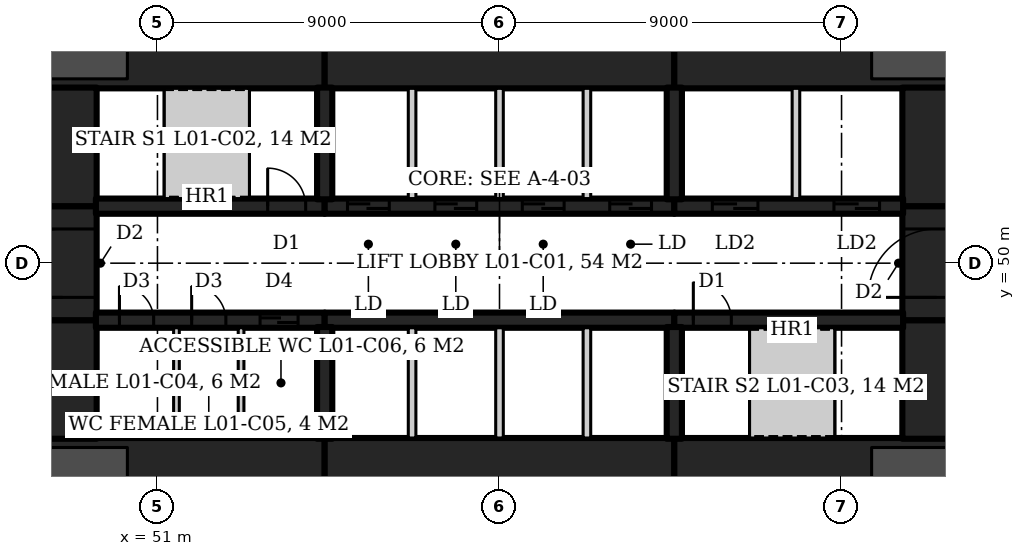
"""IFC4 building model, lengths in metres.
Left out: names, types, materials, properties, quantities, classifications, styles, units other than length and angle.
Written with IfcOpenShell. Run it as: python <this file> out.ifc"""

import sys

from ifc_helpers import new_model, si_unit, direction, frame, frame_2d, origin, origin_2d, place, context, subcontext, project, spatial, rectangle, circle, extrude, element, fill, save


model = new_model("IFC4")
c1 = context("Model", 3, precision=1e-05, world=origin(), true_north=direction((0.0, 1.0)))
c2 = subcontext(c1, "Body", "Model", "MODEL_VIEW")
j1 = project(units=[si_unit("LENGTHUNIT", "METRE"), si_unit("PLANEANGLEUNIT", "RADIAN")], contexts=[c1])
p1 = place(None, origin())
s1 = spatial("IfcSite", under=j1, at=p1, CompositionType="ELEMENT")
p2 = place(p1, origin())
s2 = spatial("IfcBuilding", under=s1, at=p2, CompositionType="ELEMENT")
p3 = place(p2, frame((0.0, 0.0, 6.0)))
s3 = spatial("IfcBuildingStorey", under=s2, at=p3, CompositionType="ELEMENT", Elevation=6.0)
for number, where, z_axis, x_axis in (
    (1, (71.691, 56.75, 0.0), (0.0, 0.0, 1.0), (1.0, 0.0, 0.0)),
    (2, (48.309, 56.75, 0.0), (0.0, 0.0, 1.0), (1.0, 0.0, 0.0)),
    (3, (48.309, 43.25, 0.0), (0.0, 0.0, 1.0), (1.0, 0.0, 0.0)),
    (4, (71.691, 43.25, 0.0), (0.0, 0.0, 1.0), (1.0, 0.0, 0.0)),
):
    element("IfcColumn", number, at=place(p3, frame(where, z_axis=z_axis, x_axis=x_axis)), inside=s3, PredefinedType="COLUMN", context=c2, shape_type="SweptSolid", body=[
        extrude(circle(Radius=1.9, at=origin_2d()), origin(), (0.0, 0.0, 1.0), 9.0),
    ])
p4 = place(p3, frame((47.6, 55.5, 0.0), z_axis=(0.0, 0.0, 1.0), x_axis=(1.0, 0.0, 0.0)))
e5 = element("IfcWall", 5, at=p4, inside=s3, PredefinedType="SHEAR", context=c2, shape_type="SweptSolid", body=[
    extrude(rectangle(XDim=7.8, YDim=1.8, at=frame_2d((3.9, 0.0))), origin(), (0.0, 0.0, 1.0), 9.0),
])
p5 = place(p3, frame((55.4, 55.5, 0.0), z_axis=(0.0, 0.0, 1.0), x_axis=(1.0, 0.0, 0.0)))
e6 = element("IfcWall", 6, at=p5, inside=s3, PredefinedType="SHEAR", context=c2, shape_type="SweptSolid", body=[
    extrude(rectangle(XDim=9.2, YDim=1.8, at=frame_2d((4.6, 0.0))), origin(), (0.0, 0.0, 1.0), 9.0),
])
for number, where, z_axis, x_axis in (
    (7, (64.6, 55.5, 0.0), (0.0, 0.0, 1.0), (1.0, 0.0, 0.0)),
    (8, (47.6, 44.5, 0.0), (0.0, 0.0, 1.0), (1.0, 0.0, 0.0)),
):
    element("IfcWall", number, at=place(p3, frame(where, z_axis=z_axis, x_axis=x_axis)), inside=s3, PredefinedType="SHEAR", context=c2, shape_type="SweptSolid", body=[
        extrude(rectangle(XDim=7.8, YDim=1.8, at=frame_2d((3.9, 0.0))), origin(), (0.0, 0.0, 1.0), 9.0),
    ])
p6 = place(p3, frame((55.4, 44.5, 0.0), z_axis=(0.0, 0.0, 1.0), x_axis=(1.0, 0.0, 0.0)))
e9 = element("IfcWall", 9, at=p6, inside=s3, PredefinedType="SHEAR", context=c2, shape_type="SweptSolid", body=[
    extrude(rectangle(XDim=9.2, YDim=1.8, at=frame_2d((4.6, 0.0))), origin(), (0.0, 0.0, 1.0), 9.0),
])
p7 = place(p3, frame((64.6, 44.5, 0.0), z_axis=(0.0, 0.0, 1.0), x_axis=(1.0, 0.0, 0.0)))
e10 = element("IfcWall", 10, at=p7, inside=s3, PredefinedType="SHEAR", context=c2, shape_type="SweptSolid", body=[
    extrude(rectangle(XDim=7.8, YDim=1.8, at=frame_2d((3.9, 0.0))), origin(), (0.0, 0.0, 1.0), 9.0),
])
p8 = place(p3, frame((71.5, 45.38, 0.0), z_axis=(0.0, 0.0, 1.0), x_axis=(0.0, 1.0, 0.0)))
e11 = element("IfcWall", 11, at=p8, inside=s3, PredefinedType="SHEAR", context=c2, shape_type="SweptSolid", body=[
    extrude(rectangle(XDim=3.12, YDim=1.8, at=frame_2d((1.56, 0.0))), origin(), (0.0, 0.0, 1.0), 9.0),
])
p9 = place(p3, frame((71.5, 48.5, 0.0), z_axis=(0.0, 0.0, 1.0), x_axis=(0.0, 1.0, 0.0)))
e12 = element("IfcWall", 12, at=p9, inside=s3, PredefinedType="SHEAR", context=c2, shape_type="SweptSolid", body=[
    extrude(rectangle(XDim=3.0, YDim=1.8, at=frame_2d((1.5, 0.0))), origin(), (0.0, 0.0, 1.0), 9.0),
])
p10 = place(p9, frame((0.6, 0.0, 0.0)))
e13 = element("IfcOpeningElement", 13, at=p10, cuts=e12, PredefinedType="OPENING", context=c2, shape_type="SweptSolid", body=[
    extrude(rectangle(XDim=1.8, YDim=2.1, at=frame_2d((0.9, 1.05))), frame((0.0, 0.91, 0.0), z_axis=(0.0, -1.0, 0.0), x_axis=(1.0, 0.0, 0.0)), (0.0, 0.0, 1.0), 1.82),
])
for number, where, z_axis, x_axis in (
    (14, (71.5, 51.5, 0.0), (0.0, 0.0, 1.0), (0.0, 1.0, 0.0)),
    (15, (48.5, 45.38, 0.0), (0.0, 0.0, 1.0), (0.0, 1.0, 0.0)),
):
    element("IfcWall", number, at=place(p3, frame(where, z_axis=z_axis, x_axis=x_axis)), inside=s3, PredefinedType="SHEAR", context=c2, shape_type="SweptSolid", body=[
        extrude(rectangle(XDim=3.12, YDim=1.8, at=frame_2d((1.56, 0.0))), origin(), (0.0, 0.0, 1.0), 9.0),
    ])
p11 = place(p3, frame((48.5, 48.5, 0.0), z_axis=(0.0, 0.0, 1.0), x_axis=(0.0, 1.0, 0.0)))
e16 = element("IfcWall", 16, at=p11, inside=s3, PredefinedType="SHEAR", context=c2, shape_type="SweptSolid", body=[
    extrude(rectangle(XDim=3.0, YDim=1.8, at=frame_2d((1.5, 0.0))), origin(), (0.0, 0.0, 1.0), 9.0),
])
p12 = place(p11, frame((0.6, 0.0, 0.0)))
e17 = element("IfcOpeningElement", 17, at=p12, cuts=e16, PredefinedType="OPENING", context=c2, shape_type="SweptSolid", body=[
    extrude(rectangle(XDim=1.8, YDim=2.1, at=frame_2d((0.9, 1.05))), frame((0.0, 0.91, 0.0), z_axis=(0.0, -1.0, 0.0), x_axis=(1.0, 0.0, 0.0)), (0.0, 0.0, 1.0), 1.82),
])
p13 = place(p3, frame((48.5, 51.5, 0.0), z_axis=(0.0, 0.0, 1.0), x_axis=(0.0, 1.0, 0.0)))
e18 = element("IfcWall", 18, at=p13, inside=s3, PredefinedType="SHEAR", context=c2, shape_type="SweptSolid", body=[
    extrude(rectangle(XDim=3.12, YDim=1.8, at=frame_2d((1.56, 0.0))), origin(), (0.0, 0.0, 1.0), 9.0),
])
p14 = place(p3, frame((49.38, 51.5, 0.0), z_axis=(0.0, 0.0, 1.0), x_axis=(1.0, 0.0, 0.0)))
e19 = element("IfcWall", 19, at=p14, inside=s3, PredefinedType="SHEAR", context=c2, shape_type="SweptSolid", body=[
    extrude(rectangle(XDim=6.02, YDim=0.4, at=frame_2d((3.01, 0.0))), origin(), (0.0, 0.0, 1.0), 9.0),
])
p15 = place(p14, frame((4.52, 0.0, 0.0)))
e20 = element("IfcOpeningElement", 20, at=p15, cuts=e19, PredefinedType="OPENING", context=c2, shape_type="SweptSolid", body=[
    extrude(rectangle(XDim=1.0, YDim=2.1, at=frame_2d((0.5, 1.05))), frame((0.0, 0.21, 0.0), z_axis=(0.0, -1.0, 0.0), x_axis=(1.0, 0.0, 0.0)), (0.0, 0.0, 1.0), 0.42),
])
p16 = place(p3, frame((55.4, 51.5, 0.0), z_axis=(0.0, 0.0, 1.0), x_axis=(1.0, 0.0, 0.0)))
e21 = element("IfcWall", 21, at=p16, inside=s3, PredefinedType="SHEAR", context=c2, shape_type="SweptSolid", body=[
    extrude(rectangle(XDim=9.2, YDim=0.4, at=frame_2d((4.6, 0.0))), origin(), (0.0, 0.0, 1.0), 9.0),
])
p17 = place(p16, frame((0.6, 0.0, 0.0)))
e22 = element("IfcOpeningElement", 22, at=p17, cuts=e21, PredefinedType="OPENING", context=c2, shape_type="SweptSolid", body=[
    extrude(rectangle(XDim=1.1, YDim=2.1, at=frame_2d((0.55, 1.05))), frame((0.0, 0.21, 0.0), z_axis=(0.0, -1.0, 0.0), x_axis=(1.0, 0.0, 0.0)), (0.0, 0.0, 1.0), 0.42),
])
p18 = place(p16, frame((2.9, 0.0, 0.0)))
e23 = element("IfcOpeningElement", 23, at=p18, cuts=e21, PredefinedType="OPENING", context=c2, shape_type="SweptSolid", body=[
    extrude(rectangle(XDim=1.1, YDim=2.1, at=frame_2d((0.55, 1.05))), frame((0.0, 0.21, 0.0), z_axis=(0.0, -1.0, 0.0), x_axis=(1.0, 0.0, 0.0)), (0.0, 0.0, 1.0), 0.42),
])
p19 = place(p16, frame((5.2, 0.0, 0.0)))
e24 = element("IfcOpeningElement", 24, at=p19, cuts=e21, PredefinedType="OPENING", context=c2, shape_type="SweptSolid", body=[
    extrude(rectangle(XDim=1.1, YDim=2.1, at=frame_2d((0.55, 1.05))), frame((0.0, 0.21, 0.0), z_axis=(0.0, -1.0, 0.0), x_axis=(1.0, 0.0, 0.0)), (0.0, 0.0, 1.0), 0.42),
])
p20 = place(p16, frame((7.5, 0.0, 0.0)))
e25 = element("IfcOpeningElement", 25, at=p20, cuts=e21, PredefinedType="OPENING", context=c2, shape_type="SweptSolid", body=[
    extrude(rectangle(XDim=1.1, YDim=2.1, at=frame_2d((0.55, 1.05))), frame((0.0, 0.21, 0.0), z_axis=(0.0, -1.0, 0.0), x_axis=(1.0, 0.0, 0.0)), (0.0, 0.0, 1.0), 0.42),
])
p21 = place(p3, frame((64.6, 51.5, 0.0), z_axis=(0.0, 0.0, 1.0), x_axis=(1.0, 0.0, 0.0)))
e26 = element("IfcWall", 26, at=p21, inside=s3, PredefinedType="SHEAR", context=c2, shape_type="SweptSolid", body=[
    extrude(rectangle(XDim=6.02, YDim=0.4, at=frame_2d((3.01, 0.0))), origin(), (0.0, 0.0, 1.0), 9.0),
])
p22 = place(p21, frame((1.0, 0.0, 0.0)))
e27 = element("IfcOpeningElement", 27, at=p22, cuts=e26, PredefinedType="OPENING", context=c2, shape_type="SweptSolid", body=[
    extrude(rectangle(XDim=1.2, YDim=2.1, at=frame_2d((0.6, 1.05))), frame((0.0, 0.21, 0.0), z_axis=(0.0, -1.0, 0.0), x_axis=(1.0, 0.0, 0.0)), (0.0, 0.0, 1.0), 0.42),
])
p23 = place(p21, frame((4.2, 0.0, 0.0)))
e28 = element("IfcOpeningElement", 28, at=p23, cuts=e26, PredefinedType="OPENING", context=c2, shape_type="SweptSolid", body=[
    extrude(rectangle(XDim=1.2, YDim=2.1, at=frame_2d((0.6, 1.05))), frame((0.0, 0.21, 0.0), z_axis=(0.0, -1.0, 0.0), x_axis=(1.0, 0.0, 0.0)), (0.0, 0.0, 1.0), 0.42),
])
p24 = place(p3, frame((49.38, 48.5, 0.0), z_axis=(0.0, 0.0, 1.0), x_axis=(1.0, 0.0, 0.0)))
e29 = element("IfcWall", 29, at=p24, inside=s3, PredefinedType="SHEAR", context=c2, shape_type="SweptSolid", body=[
    extrude(rectangle(XDim=6.02, YDim=0.4, at=frame_2d((3.01, 0.0))), origin(), (0.0, 0.0, 1.0), 9.0),
])
p25 = place(p24, frame((0.62, 0.0, 0.0)))
e30 = element("IfcOpeningElement", 30, at=p25, cuts=e29, PredefinedType="OPENING", context=c2, shape_type="SweptSolid", body=[
    extrude(rectangle(XDim=0.9, YDim=2.1, at=frame_2d((0.45, 1.05))), frame((0.0, 0.21, 0.0), z_axis=(0.0, -1.0, 0.0), x_axis=(1.0, 0.0, 0.0)), (0.0, 0.0, 1.0), 0.42),
])
p26 = place(p24, frame((2.52, 0.0, 0.0)))
e31 = element("IfcOpeningElement", 31, at=p26, cuts=e29, PredefinedType="OPENING", context=c2, shape_type="SweptSolid", body=[
    extrude(rectangle(XDim=0.9, YDim=2.1, at=frame_2d((0.45, 1.05))), frame((0.0, 0.21, 0.0), z_axis=(0.0, -1.0, 0.0), x_axis=(1.0, 0.0, 0.0)), (0.0, 0.0, 1.0), 0.42),
])
p27 = place(p24, frame((4.32, 0.0, 0.0)))
e32 = element("IfcOpeningElement", 32, at=p27, cuts=e29, PredefinedType="OPENING", context=c2, shape_type="SweptSolid", body=[
    extrude(rectangle(XDim=1.0, YDim=2.1, at=frame_2d((0.5, 1.05))), frame((0.0, 0.21, 0.0), z_axis=(0.0, -1.0, 0.0), x_axis=(1.0, 0.0, 0.0)), (0.0, 0.0, 1.0), 0.42),
])
p28 = place(p3, frame((55.4, 48.5, 0.0), z_axis=(0.0, 0.0, 1.0), x_axis=(1.0, 0.0, 0.0)))
e33 = element("IfcWall", 33, at=p28, inside=s3, PredefinedType="SHEAR", context=c2, shape_type="SweptSolid", body=[
    extrude(rectangle(XDim=9.2, YDim=0.4, at=frame_2d((4.6, 0.0))), origin(), (0.0, 0.0, 1.0), 9.0),
])
p29 = place(p3, frame((64.6, 48.5, 0.0), z_axis=(0.0, 0.0, 1.0), x_axis=(1.0, 0.0, 0.0)))
e34 = element("IfcWall", 34, at=p29, inside=s3, PredefinedType="SHEAR", context=c2, shape_type="SweptSolid", body=[
    extrude(rectangle(XDim=6.02, YDim=0.4, at=frame_2d((3.01, 0.0))), origin(), (0.0, 0.0, 1.0), 9.0),
])
p30 = place(p29, frame((0.5, 0.0, 0.0)))
e35 = element("IfcOpeningElement", 35, at=p30, cuts=e34, PredefinedType="OPENING", context=c2, shape_type="SweptSolid", body=[
    extrude(rectangle(XDim=1.0, YDim=2.1, at=frame_2d((0.5, 1.05))), frame((0.0, 0.21, 0.0), z_axis=(0.0, -1.0, 0.0), x_axis=(1.0, 0.0, 0.0)), (0.0, 0.0, 1.0), 0.42),
])
for number, where, z_axis, x_axis in (
    (36, (55.4, 51.68, 0.0), (0.0, 0.0, 1.0), (0.0, 1.0, 0.0)),
    (37, (64.6, 51.68, 0.0), (0.0, 0.0, 1.0), (0.0, 1.0, 0.0)),
    (38, (55.4, 48.32, 0.0), (0.0, 0.0, 1.0), (0.0, -1.0, 0.0)),
    (39, (64.6, 48.32, 0.0), (0.0, 0.0, 1.0), (0.0, -1.0, 0.0)),
):
    element("IfcWall", number, at=place(p3, frame(where, z_axis=z_axis, x_axis=x_axis)), inside=s3, PredefinedType="SHEAR", context=c2, shape_type="SweptSolid", body=[
        extrude(rectangle(XDim=2.94, YDim=0.4, at=frame_2d((1.47, 0.0))), origin(), (0.0, 0.0, 1.0), 9.0),
    ])
for number, where, z_axis, x_axis in (
    (40, (57.7, 51.7, 0.0), (0.0, 0.0, 1.0), (0.0, 1.0, 0.0)),
    (41, (60.0, 51.7, 0.0), (0.0, 0.0, 1.0), (0.0, 1.0, 0.0)),
    (42, (62.3, 51.7, 0.0), (0.0, 0.0, 1.0), (0.0, 1.0, 0.0)),
    (43, (57.7, 45.4, 0.0), (0.0, 0.0, 1.0), (0.0, 1.0, 0.0)),
    (44, (60.0, 45.4, 0.0), (0.0, 0.0, 1.0), (0.0, 1.0, 0.0)),
    (45, (62.3, 45.4, 0.0), (0.0, 0.0, 1.0), (0.0, 1.0, 0.0)),
    (46, (67.8, 51.7, 0.0), (0.0, 0.0, 1.0), (0.0, 1.0, 0.0)),
):
    element("IfcWall", number, at=place(p3, frame(where, z_axis=z_axis, x_axis=x_axis)), inside=s3, PredefinedType="PARTITIONING", context=c2, shape_type="SweptSolid", body=[
        extrude(rectangle(XDim=2.9, YDim=0.2, at=frame_2d((1.45, 0.0))), origin(), (0.0, 0.0, 1.0), 9.0),
    ])
for number, where, z_axis, x_axis in (
    (47, (51.5, 45.4, 0.0), (0.0, 0.0, 1.0), (0.0, 1.0, 0.0)),
    (48, (53.2, 45.4, 0.0), (0.0, 0.0, 1.0), (0.0, 1.0, 0.0)),
):
    element("IfcWall", number, at=place(p3, frame(where, z_axis=z_axis, x_axis=x_axis)), inside=s3, PredefinedType="PARTITIONING", context=c2, shape_type="SweptSolid", body=[
        extrude(rectangle(XDim=2.9, YDim=0.15, at=frame_2d((1.45, 0.0))), origin(), (0.0, 0.0, 1.0), 8.7),
    ])
p31 = place(p15, origin())
e49 = element("IfcDoor", 49, at=p31, inside=s3, OperationType="SINGLE_SWING_LEFT", PredefinedType="DOOR", context=c2, shape_type="SweptSolid", body=[
    extrude(rectangle(XDim=1.0, YDim=2.1, at=frame_2d((0.5, 1.05))), frame((0.0, 0.025, 0.0), z_axis=(0.0, -1.0, 0.0), x_axis=(1.0, 0.0, 0.0)), (0.0, 0.0, 1.0), 0.05),
])
fill(e20, e49)
p32 = place(p30, origin())
e50 = element("IfcDoor", 50, at=p32, inside=s3, OperationType="SINGLE_SWING_LEFT", PredefinedType="DOOR", context=c2, shape_type="SweptSolid", body=[
    extrude(rectangle(XDim=1.0, YDim=2.1, at=frame_2d((0.5, 1.05))), frame((0.0, 0.025, 0.0), z_axis=(0.0, -1.0, 0.0), x_axis=(1.0, 0.0, 0.0)), (0.0, 0.0, 1.0), 0.05),
])
fill(e35, e50)
p33 = place(p22, origin())
e51 = element("IfcDoor", 51, at=p33, inside=s3, OperationType="SLIDING_TO_LEFT", PredefinedType="DOOR", context=c2, shape_type="SweptSolid", body=[
    extrude(rectangle(XDim=1.2, YDim=2.1, at=frame_2d((0.6, 1.05))), frame((0.0, 0.025, 0.0), z_axis=(0.0, -1.0, 0.0), x_axis=(1.0, 0.0, 0.0)), (0.0, 0.0, 1.0), 0.05),
])
fill(e27, e51)
p34 = place(p23, origin())
e52 = element("IfcDoor", 52, at=p34, inside=s3, OperationType="SLIDING_TO_LEFT", PredefinedType="DOOR", context=c2, shape_type="SweptSolid", body=[
    extrude(rectangle(XDim=1.2, YDim=2.1, at=frame_2d((0.6, 1.05))), frame((0.0, 0.025, 0.0), z_axis=(0.0, -1.0, 0.0), x_axis=(1.0, 0.0, 0.0)), (0.0, 0.0, 1.0), 0.05),
])
fill(e28, e52)
p35 = place(p17, origin())
e53 = element("IfcDoor", 53, at=p35, inside=s3, OperationType="SLIDING_TO_LEFT", PredefinedType="DOOR", context=c2, shape_type="SweptSolid", body=[
    extrude(rectangle(XDim=1.1, YDim=2.1, at=frame_2d((0.55, 1.05))), frame((0.0, 0.025, 0.0), z_axis=(0.0, -1.0, 0.0), x_axis=(1.0, 0.0, 0.0)), (0.0, 0.0, 1.0), 0.05),
])
fill(e22, e53)
p36 = place(p18, origin())
e54 = element("IfcDoor", 54, at=p36, inside=s3, OperationType="SLIDING_TO_LEFT", PredefinedType="DOOR", context=c2, shape_type="SweptSolid", body=[
    extrude(rectangle(XDim=1.1, YDim=2.1, at=frame_2d((0.55, 1.05))), frame((0.0, 0.025, 0.0), z_axis=(0.0, -1.0, 0.0), x_axis=(1.0, 0.0, 0.0)), (0.0, 0.0, 1.0), 0.05),
])
fill(e23, e54)
p37 = place(p19, origin())
e55 = element("IfcDoor", 55, at=p37, inside=s3, OperationType="SLIDING_TO_LEFT", PredefinedType="DOOR", context=c2, shape_type="SweptSolid", body=[
    extrude(rectangle(XDim=1.1, YDim=2.1, at=frame_2d((0.55, 1.05))), frame((0.0, 0.025, 0.0), z_axis=(0.0, -1.0, 0.0), x_axis=(1.0, 0.0, 0.0)), (0.0, 0.0, 1.0), 0.05),
])
fill(e24, e55)
p38 = place(p20, origin())
e56 = element("IfcDoor", 56, at=p38, inside=s3, OperationType="SLIDING_TO_LEFT", PredefinedType="DOOR", context=c2, shape_type="SweptSolid", body=[
    extrude(rectangle(XDim=1.1, YDim=2.1, at=frame_2d((0.55, 1.05))), frame((0.0, 0.025, 0.0), z_axis=(0.0, -1.0, 0.0), x_axis=(1.0, 0.0, 0.0)), (0.0, 0.0, 1.0), 0.05),
])
fill(e25, e56)
p39 = place(p25, origin())
e57 = element("IfcDoor", 57, at=p39, inside=s3, OperationType="SINGLE_SWING_RIGHT", PredefinedType="DOOR", context=c2, shape_type="SweptSolid", body=[
    extrude(rectangle(XDim=0.9, YDim=2.1, at=frame_2d((0.45, 1.05))), frame((0.0, 0.025, 0.0), z_axis=(0.0, -1.0, 0.0), x_axis=(1.0, 0.0, 0.0)), (0.0, 0.0, 1.0), 0.05),
])
fill(e30, e57)
p40 = place(p26, origin())
e58 = element("IfcDoor", 58, at=p40, inside=s3, OperationType="SINGLE_SWING_RIGHT", PredefinedType="DOOR", context=c2, shape_type="SweptSolid", body=[
    extrude(rectangle(XDim=0.9, YDim=2.1, at=frame_2d((0.45, 1.05))), frame((0.0, 0.025, 0.0), z_axis=(0.0, -1.0, 0.0), x_axis=(1.0, 0.0, 0.0)), (0.0, 0.0, 1.0), 0.05),
])
fill(e31, e58)
p41 = place(p27, origin())
e59 = element("IfcDoor", 59, at=p41, inside=s3, OperationType="SLIDING_TO_LEFT", PredefinedType="DOOR", context=c2, shape_type="SweptSolid", body=[
    extrude(rectangle(XDim=1.0, YDim=2.1, at=frame_2d((0.5, 1.05))), frame((0.0, 0.025, 0.0), z_axis=(0.0, -1.0, 0.0), x_axis=(1.0, 0.0, 0.0)), (0.0, 0.0, 1.0), 0.05),
])
fill(e32, e59)
p42 = place(p10, origin())
e60 = element("IfcDoor", 60, at=p42, inside=s3, OperationType="DOUBLE_DOOR_DOUBLE_SWING", PredefinedType="DOOR", context=c2, shape_type="SweptSolid", body=[
    extrude(rectangle(XDim=1.8, YDim=2.1, at=frame_2d((0.9, 1.05))), frame((0.0, 0.025, 0.0), z_axis=(0.0, -1.0, 0.0), x_axis=(1.0, 0.0, 0.0)), (0.0, 0.0, 1.0), 0.05),
])
fill(e13, e60)
p43 = place(p12, origin())
e61 = element("IfcDoor", 61, at=p43, inside=s3, OperationType="DOUBLE_DOOR_DOUBLE_SWING", PredefinedType="DOOR", context=c2, shape_type="SweptSolid", body=[
    extrude(rectangle(XDim=1.8, YDim=2.1, at=frame_2d((0.9, 1.05))), frame((0.0, 0.025, 0.0), z_axis=(0.0, -1.0, 0.0), x_axis=(1.0, 0.0, 0.0)), (0.0, 0.0, 1.0), 0.05),
])
fill(e17, e61)
save(model, sys.argv[1])
